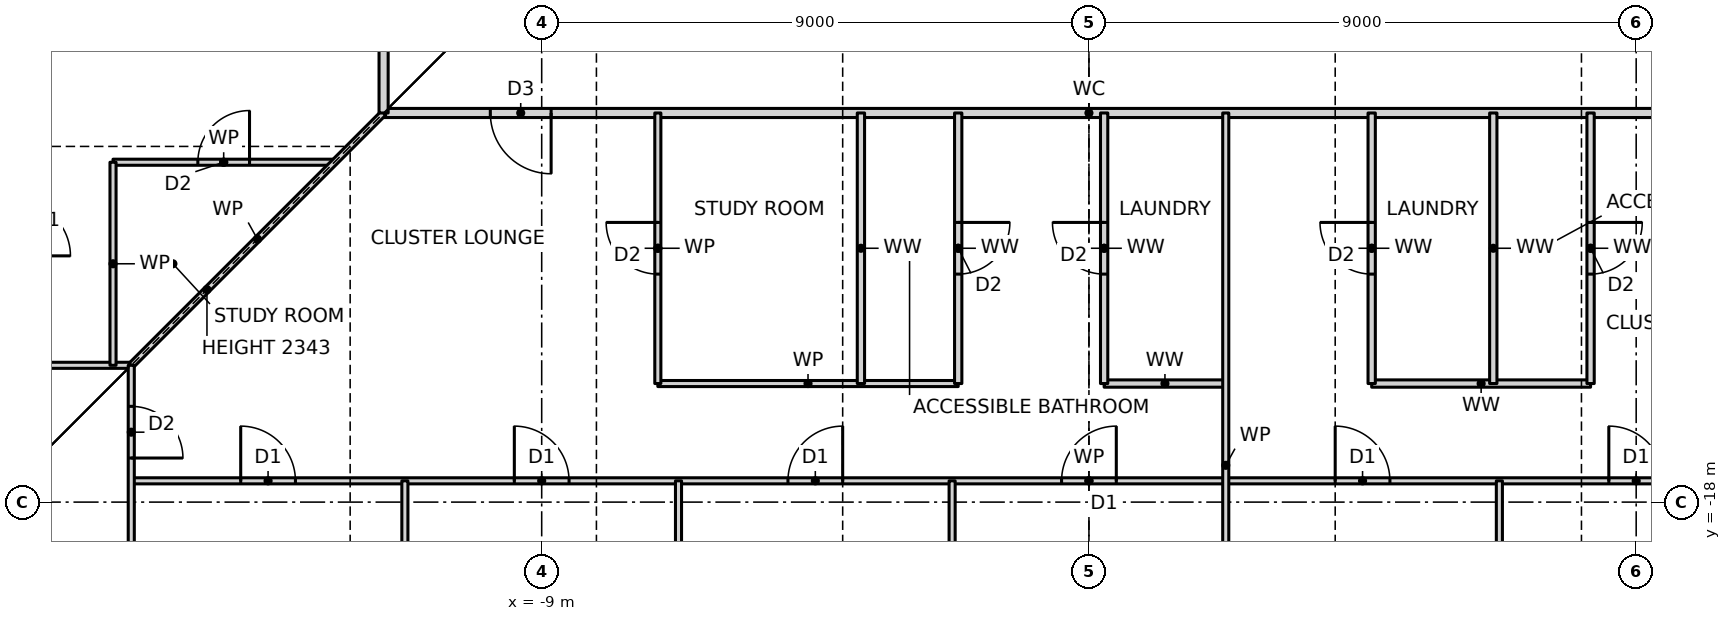
"""IFC4 building model, lengths in metres.
Left out: names, types, materials, properties, quantities, classifications, styles, units other than length and angle.
Written with IfcOpenShell. Run it as: python <this file> out.ifc"""

import sys

from ifc_helpers import new_model, si_unit, direction, frame, frame_2d, origin, place, context, subcontext, project, spatial, rectangle, extrude, element, fill, save


model = new_model("IFC4")
c1 = context("Model", 3, precision=1e-05, world=origin(), true_north=direction((0.0, 1.0)))
c2 = subcontext(c1, "Body", "Model", "MODEL_VIEW")
j1 = project(units=[si_unit("LENGTHUNIT", "METRE"), si_unit("PLANEANGLEUNIT", "RADIAN")], contexts=[c1])
p1 = place(None, origin())
s1 = spatial("IfcSite", under=j1, at=p1, CompositionType="ELEMENT")
p2 = place(p1, origin())
s2 = spatial("IfcBuilding", under=s1, at=p2, CompositionType="ELEMENT")
p3 = place(p2, frame((0.0, 0.0, 64.0)))
s3 = spatial("IfcBuildingStorey", under=s2, at=p3, CompositionType="ELEMENT", Elevation=64.0)
p4 = place(p3, frame((-15.75, -17.65, 0.0), z_axis=(0.0, 0.0, 1.0), x_axis=(1.0, 0.0, 0.0)))
e1 = element("IfcWall", 1, at=p4, inside=s3, PredefinedType="PARTITIONING", context=c2, shape_type="SweptSolid", body=[
    extrude(rectangle(XDim=31.5, YDim=0.1, at=frame_2d((15.75, 0.0))), origin(), (0.0, 0.0, 1.0), 3.27),
])
p5 = place(p4, frame((1.8, 0.0, 0.0)))
e2 = element("IfcOpeningElement", 2, at=p5, cuts=e1, PredefinedType="OPENING", context=c2, shape_type="SweptSolid", body=[
    extrude(rectangle(XDim=0.9, YDim=2.1, at=frame_2d((0.45, 1.05))), frame((0.0, 0.06, 0.0), z_axis=(0.0, -1.0, 0.0), x_axis=(1.0, 0.0, 0.0)), (0.0, 0.0, 1.0), 0.12),
])
p6 = place(p4, frame((6.3, 0.0, 0.0)))
e3 = element("IfcOpeningElement", 3, at=p6, cuts=e1, PredefinedType="OPENING", context=c2, shape_type="SweptSolid", body=[
    extrude(rectangle(XDim=0.9, YDim=2.1, at=frame_2d((0.45, 1.05))), frame((0.0, 0.06, 0.0), z_axis=(0.0, -1.0, 0.0), x_axis=(1.0, 0.0, 0.0)), (0.0, 0.0, 1.0), 0.12),
])
p7 = place(p4, frame((10.8, 0.0, 0.0)))
e4 = element("IfcOpeningElement", 4, at=p7, cuts=e1, PredefinedType="OPENING", context=c2, shape_type="SweptSolid", body=[
    extrude(rectangle(XDim=0.9, YDim=2.1, at=frame_2d((0.45, 1.05))), frame((0.0, 0.06, 0.0), z_axis=(0.0, -1.0, 0.0), x_axis=(1.0, 0.0, 0.0)), (0.0, 0.0, 1.0), 0.12),
])
p8 = place(p4, frame((15.3, 0.0, 0.0)))
e5 = element("IfcOpeningElement", 5, at=p8, cuts=e1, PredefinedType="OPENING", context=c2, shape_type="SweptSolid", body=[
    extrude(rectangle(XDim=0.9, YDim=2.1, at=frame_2d((0.45, 1.05))), frame((0.0, 0.06, 0.0), z_axis=(0.0, -1.0, 0.0), x_axis=(1.0, 0.0, 0.0)), (0.0, 0.0, 1.0), 0.12),
])
p9 = place(p4, frame((19.8, 0.0, 0.0)))
e6 = element("IfcOpeningElement", 6, at=p9, cuts=e1, PredefinedType="OPENING", context=c2, shape_type="SweptSolid", body=[
    extrude(rectangle(XDim=0.9, YDim=2.1, at=frame_2d((0.45, 1.05))), frame((0.0, 0.06, 0.0), z_axis=(0.0, -1.0, 0.0), x_axis=(1.0, 0.0, 0.0)), (0.0, 0.0, 1.0), 0.12),
])
p10 = place(p4, frame((24.3, 0.0, 0.0)))
e7 = element("IfcOpeningElement", 7, at=p10, cuts=e1, PredefinedType="OPENING", context=c2, shape_type="SweptSolid", body=[
    extrude(rectangle(XDim=0.9, YDim=2.1, at=frame_2d((0.45, 1.05))), frame((0.0, 0.06, 0.0), z_axis=(0.0, -1.0, 0.0), x_axis=(1.0, 0.0, 0.0)), (0.0, 0.0, 1.0), 0.12),
])
p11 = place(p4, frame((28.8, 0.0, 0.0)))
e8 = element("IfcOpeningElement", 8, at=p11, cuts=e1, PredefinedType="OPENING", context=c2, shape_type="SweptSolid", body=[
    extrude(rectangle(XDim=0.9, YDim=2.1, at=frame_2d((0.45, 1.05))), frame((0.0, 0.06, 0.0), z_axis=(0.0, -1.0, 0.0), x_axis=(1.0, 0.0, 0.0)), (0.0, 0.0, 1.0), 0.12),
])
p12 = place(p3, frame((-7.09, -16.05, 0.0), z_axis=(0.0, 0.0, 1.0), x_axis=(1.0, 0.0, 0.0)))
e9 = element("IfcWall", 9, at=p12, inside=s3, PredefinedType="PARTITIONING", context=c2, shape_type="SweptSolid", body=[
    extrude(rectangle(XDim=4.94, YDim=0.1, at=frame_2d((2.47, 0.0))), origin(), (0.0, 0.0, 1.0), 3.27),
])
p13 = place(p3, frame((0.25, -16.05, 0.0), z_axis=(0.0, 0.0, 1.0), x_axis=(1.0, 0.0, 0.0)))
e10 = element("IfcWall", 10, at=p13, inside=s3, PredefinedType="PARTITIONING", context=c2, shape_type="SweptSolid", body=[
    extrude(rectangle(XDim=2.0, YDim=0.12, at=frame_2d((1.0, 0.0))), origin(), (0.0, 0.0, 1.0), 3.27),
])
p14 = place(p3, frame((4.65, -16.05, 0.0), z_axis=(0.0, 0.0, 1.0), x_axis=(1.0, 0.0, 0.0)))
e11 = element("IfcWall", 11, at=p14, inside=s3, PredefinedType="PARTITIONING", context=c2, shape_type="SweptSolid", body=[
    extrude(rectangle(XDim=3.6, YDim=0.12, at=frame_2d((1.8, 0.0))), origin(), (0.0, 0.0, 1.0), 3.27),
])
p15 = place(p3, frame((-23.19, -15.75, 0.0), z_axis=(0.0, 0.0, 1.0), x_axis=(1.0, 0.0, 0.0)))
e12 = element("IfcWall", 12, at=p15, inside=s3, PredefinedType="PARTITIONING", context=c2, shape_type="SweptSolid", body=[
    extrude(rectangle(XDim=7.44, YDim=0.1, at=frame_2d((3.72, 0.0))), origin(), (0.0, 0.0, 1.0), 3.27),
])
p16 = place(p3, frame((-16.05, -12.41, 0.0), z_axis=(0.0, 0.0, 1.0), x_axis=(1.0, 0.0, 0.0)))
e13 = element("IfcWall", 13, at=p16, inside=s3, PredefinedType="PARTITIONING", context=c2, shape_type="SweptSolid", body=[
    extrude(rectangle(XDim=3.64, YDim=0.1, at=frame_2d((1.82, 0.0))), origin(), (0.0, 0.0, 1.0), 3.27),
])
p17 = place(p16, frame((1.395, 0.0, 0.0)))
e14 = element("IfcOpeningElement", 14, at=p17, cuts=e13, PredefinedType="OPENING", context=c2, shape_type="SweptSolid", body=[
    extrude(rectangle(XDim=0.85, YDim=2.1, at=frame_2d((0.425, 1.05))), frame((0.0, 0.06, 0.0), z_axis=(0.0, -1.0, 0.0), x_axis=(1.0, 0.0, 0.0)), (0.0, 0.0, 1.0), 0.12),
])
p18 = place(p3, frame((-11.6, -11.6, 0.0), z_axis=(0.0, 0.0, 1.0), x_axis=(1.0, 0.0, 0.0)))
e15 = element("IfcWall", 15, at=p18, inside=s3, PredefinedType="PARTITIONING", context=c2, shape_type="SweptSolid", body=[
    extrude(rectangle(XDim=23.2, YDim=0.15, at=frame_2d((11.6, 0.0))), origin(), (0.0, 0.0, 1.0), 3.27),
])
p19 = place(p18, frame((1.755, 0.0, 0.0)))
e16 = element("IfcOpeningElement", 16, at=p19, cuts=e15, PredefinedType="OPENING", context=c2, shape_type="SweptSolid", body=[
    extrude(rectangle(XDim=1.0, YDim=2.1, at=frame_2d((0.5, 1.05))), frame((0.0, 0.085, 0.0), z_axis=(0.0, -1.0, 0.0), x_axis=(1.0, 0.0, 0.0)), (0.0, 0.0, 1.0), 0.17),
])
p20 = place(p18, frame((21.025, 0.0, 0.0)))
e17 = element("IfcOpeningElement", 17, at=p20, cuts=e15, PredefinedType="OPENING", context=c2, shape_type="SweptSolid", body=[
    extrude(rectangle(XDim=1.0, YDim=2.1, at=frame_2d((0.5, 1.05))), frame((0.0, 0.085, 0.0), z_axis=(0.0, -1.0, 0.0), x_axis=(1.0, 0.0, 0.0)), (0.0, 0.0, 1.0), 0.17),
])
p21 = place(p3, frame((-15.75, -15.75, 0.0), z_axis=(0.0, 0.0, 1.0), x_axis=(0.707106781187, 0.707106781187, 0.0)))
e18 = element("IfcWall", 18, at=p21, inside=s3, PredefinedType="PARTITIONING", context=c2, shape_type="SweptSolid", body=[
    extrude(rectangle(XDim=5.869, YDim=0.1, at=frame_2d((2.935, 0.0))), origin(), (0.0, 0.0, 1.0), 2.343),
])
p22 = place(p3, frame((8.25, -16.05, 0.0), z_axis=(0.0, 0.0, 1.0), x_axis=(0.0, 1.0, 0.0)))
e19 = element("IfcWall", 19, at=p22, inside=s3, PredefinedType="PARTITIONING", context=c2, shape_type="SweptSolid", body=[
    extrude(rectangle(XDim=4.45, YDim=0.12, at=frame_2d((2.225, 0.0))), origin(), (0.0, 0.0, 1.0), 3.27),
])
p23 = place(p22, frame((1.8, 0.0, 0.0)))
e20 = element("IfcOpeningElement", 20, at=p23, cuts=e19, PredefinedType="OPENING", context=c2, shape_type="SweptSolid", body=[
    extrude(rectangle(XDim=0.85, YDim=2.1, at=frame_2d((0.425, 1.05))), frame((0.0, 0.07, 0.0), z_axis=(0.0, -1.0, 0.0), x_axis=(1.0, 0.0, 0.0)), (0.0, 0.0, 1.0), 0.14),
])
p24 = place(p3, frame((6.75, -23.19, 0.0), z_axis=(0.0, 0.0, 1.0), x_axis=(0.0, 1.0, 0.0)))
e21 = element("IfcWall", 21, at=p24, inside=s3, PredefinedType="PARTITIONING", context=c2, shape_type="SweptSolid", body=[
    extrude(rectangle(XDim=5.54, YDim=0.1, at=frame_2d((2.77, 0.0))), origin(), (0.0, 0.0, 1.0), 3.27),
])
p25 = place(p3, frame((6.65, -16.05, 0.0), z_axis=(0.0, 0.0, 1.0), x_axis=(0.0, 1.0, 0.0)))
e22 = element("IfcWall", 22, at=p25, inside=s3, PredefinedType="PARTITIONING", context=c2, shape_type="SweptSolid", body=[
    extrude(rectangle(XDim=4.45, YDim=0.12, at=frame_2d((2.225, 0.0))), origin(), (0.0, 0.0, 1.0), 3.27),
])
p26 = place(p3, frame((4.65, -16.05, 0.0), z_axis=(0.0, 0.0, 1.0), x_axis=(0.0, 1.0, 0.0)))
e23 = element("IfcWall", 23, at=p26, inside=s3, PredefinedType="PARTITIONING", context=c2, shape_type="SweptSolid", body=[
    extrude(rectangle(XDim=4.45, YDim=0.12, at=frame_2d((2.225, 0.0))), origin(), (0.0, 0.0, 1.0), 3.27),
])
p27 = place(p26, frame((1.8, 0.0, 0.0)))
e24 = element("IfcOpeningElement", 24, at=p27, cuts=e23, PredefinedType="OPENING", context=c2, shape_type="SweptSolid", body=[
    extrude(rectangle(XDim=0.85, YDim=2.1, at=frame_2d((0.425, 1.05))), frame((0.0, 0.07, 0.0), z_axis=(0.0, -1.0, 0.0), x_axis=(1.0, 0.0, 0.0)), (0.0, 0.0, 1.0), 0.14),
])
p28 = place(p3, frame((2.25, -23.19, 0.0), z_axis=(0.0, 0.0, 1.0), x_axis=(0.0, 1.0, 0.0)))
e25 = element("IfcWall", 25, at=p28, inside=s3, PredefinedType="PARTITIONING", context=c2, shape_type="SweptSolid", body=[
    extrude(rectangle(XDim=11.59, YDim=0.1, at=frame_2d((5.795, 0.0))), origin(), (0.0, 0.0, 1.0), 3.27),
])
p29 = place(p3, frame((0.25, -16.05, 0.0), z_axis=(0.0, 0.0, 1.0), x_axis=(0.0, 1.0, 0.0)))
e26 = element("IfcWall", 26, at=p29, inside=s3, PredefinedType="PARTITIONING", context=c2, shape_type="SweptSolid", body=[
    extrude(rectangle(XDim=4.45, YDim=0.12, at=frame_2d((2.225, 0.0))), origin(), (0.0, 0.0, 1.0), 3.27),
])
p30 = place(p29, frame((1.8, 0.0, 0.0)))
e27 = element("IfcOpeningElement", 27, at=p30, cuts=e26, PredefinedType="OPENING", context=c2, shape_type="SweptSolid", body=[
    extrude(rectangle(XDim=0.85, YDim=2.1, at=frame_2d((0.425, 1.05))), frame((0.0, 0.07, 0.0), z_axis=(0.0, -1.0, 0.0), x_axis=(1.0, 0.0, 0.0)), (0.0, 0.0, 1.0), 0.14),
])
p31 = place(p3, frame((-2.15, -16.05, 0.0), z_axis=(0.0, 0.0, 1.0), x_axis=(0.0, 1.0, 0.0)))
e28 = element("IfcWall", 28, at=p31, inside=s3, PredefinedType="PARTITIONING", context=c2, shape_type="SweptSolid", body=[
    extrude(rectangle(XDim=4.45, YDim=0.12, at=frame_2d((2.225, 0.0))), origin(), (0.0, 0.0, 1.0), 3.27),
])
p32 = place(p31, frame((1.8, 0.0, 0.0)))
e29 = element("IfcOpeningElement", 29, at=p32, cuts=e28, PredefinedType="OPENING", context=c2, shape_type="SweptSolid", body=[
    extrude(rectangle(XDim=0.85, YDim=2.1, at=frame_2d((0.425, 1.05))), frame((0.0, 0.07, 0.0), z_axis=(0.0, -1.0, 0.0), x_axis=(1.0, 0.0, 0.0)), (0.0, 0.0, 1.0), 0.14),
])
p33 = place(p3, frame((-2.25, -23.19, 0.0), z_axis=(0.0, 0.0, 1.0), x_axis=(0.0, 1.0, 0.0)))
e30 = element("IfcWall", 30, at=p33, inside=s3, PredefinedType="PARTITIONING", context=c2, shape_type="SweptSolid", body=[
    extrude(rectangle(XDim=5.54, YDim=0.1, at=frame_2d((2.77, 0.0))), origin(), (0.0, 0.0, 1.0), 3.27),
])
p34 = place(p3, frame((-3.75, -16.05, 0.0), z_axis=(0.0, 0.0, 1.0), x_axis=(0.0, 1.0, 0.0)))
e31 = element("IfcWall", 31, at=p34, inside=s3, PredefinedType="PARTITIONING", context=c2, shape_type="SweptSolid", body=[
    extrude(rectangle(XDim=4.45, YDim=0.12, at=frame_2d((2.225, 0.0))), origin(), (0.0, 0.0, 1.0), 3.27),
])
p35 = place(p3, frame((-6.75, -23.19, 0.0), z_axis=(0.0, 0.0, 1.0), x_axis=(0.0, 1.0, 0.0)))
e32 = element("IfcWall", 32, at=p35, inside=s3, PredefinedType="PARTITIONING", context=c2, shape_type="SweptSolid", body=[
    extrude(rectangle(XDim=5.54, YDim=0.1, at=frame_2d((2.77, 0.0))), origin(), (0.0, 0.0, 1.0), 3.27),
])
p36 = place(p3, frame((-7.09, -16.05, 0.0), z_axis=(0.0, 0.0, 1.0), x_axis=(0.0, 1.0, 0.0)))
e33 = element("IfcWall", 33, at=p36, inside=s3, PredefinedType="PARTITIONING", context=c2, shape_type="SweptSolid", body=[
    extrude(rectangle(XDim=4.45, YDim=0.1, at=frame_2d((2.225, 0.0))), origin(), (0.0, 0.0, 1.0), 3.27),
])
p37 = place(p36, frame((1.8, 0.0, 0.0)))
e34 = element("IfcOpeningElement", 34, at=p37, cuts=e33, PredefinedType="OPENING", context=c2, shape_type="SweptSolid", body=[
    extrude(rectangle(XDim=0.85, YDim=2.1, at=frame_2d((0.425, 1.05))), frame((0.0, 0.06, 0.0), z_axis=(0.0, -1.0, 0.0), x_axis=(1.0, 0.0, 0.0)), (0.0, 0.0, 1.0), 0.12),
])
p38 = place(p3, frame((-11.25, -23.19, 0.0), z_axis=(0.0, 0.0, 1.0), x_axis=(0.0, 1.0, 0.0)))
e35 = element("IfcWall", 35, at=p38, inside=s3, PredefinedType="PARTITIONING", context=c2, shape_type="SweptSolid", body=[
    extrude(rectangle(XDim=5.54, YDim=0.1, at=frame_2d((2.77, 0.0))), origin(), (0.0, 0.0, 1.0), 3.27),
])
p39 = place(p3, frame((-11.6, -11.6, 0.0), z_axis=(0.0, 0.0, 1.0), x_axis=(0.0, 1.0, 0.0)))
e36 = element("IfcWall", 36, at=p39, inside=s3, PredefinedType="PARTITIONING", context=c2, shape_type="SweptSolid", body=[
    extrude(rectangle(XDim=24.2, YDim=0.15, at=frame_2d((12.1, 0.0))), origin(), (0.0, 0.0, 1.0), 3.27),
])
p40 = place(p39, frame((19.225, 0.0, 0.0)))
e37 = element("IfcOpeningElement", 37, at=p40, cuts=e36, PredefinedType="OPENING", context=c2, shape_type="SweptSolid", body=[
    extrude(rectangle(XDim=1.0, YDim=2.1, at=frame_2d((0.5, 1.05))), frame((0.0, 0.085, 0.0), z_axis=(0.0, -1.0, 0.0), x_axis=(1.0, 0.0, 0.0)), (0.0, 0.0, 1.0), 0.17),
])
p41 = place(p39, frame((3.425, 0.0, 0.0)))
e38 = element("IfcOpeningElement", 38, at=p41, cuts=e36, PredefinedType="OPENING", context=c2, shape_type="SweptSolid", body=[
    extrude(rectangle(XDim=1.0, YDim=2.1, at=frame_2d((0.5, 1.05))), frame((0.0, 0.085, 0.0), z_axis=(0.0, -1.0, 0.0), x_axis=(1.0, 0.0, 0.0)), (0.0, 0.0, 1.0), 0.17),
])
p42 = place(p3, frame((-15.75, -23.19, 0.0), z_axis=(0.0, 0.0, 1.0), x_axis=(0.0, 1.0, 0.0)))
e39 = element("IfcWall", 39, at=p42, inside=s3, PredefinedType="PARTITIONING", context=c2, shape_type="SweptSolid", body=[
    extrude(rectangle(XDim=7.44, YDim=0.1, at=frame_2d((3.72, 0.0))), origin(), (0.0, 0.0, 1.0), 3.27),
])
p43 = place(p42, frame((5.915, 0.0, 0.0)))
e40 = element("IfcOpeningElement", 40, at=p43, cuts=e39, PredefinedType="OPENING", context=c2, shape_type="SweptSolid", body=[
    extrude(rectangle(XDim=0.85, YDim=2.1, at=frame_2d((0.425, 1.05))), frame((0.0, 0.06, 0.0), z_axis=(0.0, -1.0, 0.0), x_axis=(1.0, 0.0, 0.0)), (0.0, 0.0, 1.0), 0.12),
])
p44 = place(p3, frame((-16.05, -15.75, 0.0), z_axis=(0.0, 0.0, 1.0), x_axis=(0.0, 1.0, 0.0)))
e41 = element("IfcWall", 41, at=p44, inside=s3, PredefinedType="PARTITIONING", context=c2, shape_type="SweptSolid", body=[
    extrude(rectangle(XDim=3.34, YDim=0.1, at=frame_2d((1.67, 0.0))), origin(), (0.0, 0.0, 1.0), 3.27),
])
p45 = place(p5, origin())
e42 = element("IfcDoor", 42, at=p45, inside=s3, OperationType="SINGLE_SWING_LEFT", PredefinedType="DOOR", context=c2, shape_type="SweptSolid", body=[
    extrude(rectangle(XDim=0.9, YDim=2.1, at=frame_2d((0.45, 1.05))), frame((0.0, 0.025, 0.0), z_axis=(0.0, -1.0, 0.0), x_axis=(1.0, 0.0, 0.0)), (0.0, 0.0, 1.0), 0.05),
])
fill(e2, e42)
p46 = place(p6, origin())
e43 = element("IfcDoor", 43, at=p46, inside=s3, OperationType="SINGLE_SWING_LEFT", PredefinedType="DOOR", context=c2, shape_type="SweptSolid", body=[
    extrude(rectangle(XDim=0.9, YDim=2.1, at=frame_2d((0.45, 1.05))), frame((0.0, 0.025, 0.0), z_axis=(0.0, -1.0, 0.0), x_axis=(1.0, 0.0, 0.0)), (0.0, 0.0, 1.0), 0.05),
])
fill(e3, e43)
p47 = place(p7, origin())
e44 = element("IfcDoor", 44, at=p47, inside=s3, OperationType="SINGLE_SWING_RIGHT", PredefinedType="DOOR", context=c2, shape_type="SweptSolid", body=[
    extrude(rectangle(XDim=0.9, YDim=2.1, at=frame_2d((0.45, 1.05))), frame((0.0, 0.025, 0.0), z_axis=(0.0, -1.0, 0.0), x_axis=(1.0, 0.0, 0.0)), (0.0, 0.0, 1.0), 0.05),
])
fill(e4, e44)
p48 = place(p8, origin())
e45 = element("IfcDoor", 45, at=p48, inside=s3, OperationType="SINGLE_SWING_RIGHT", PredefinedType="DOOR", context=c2, shape_type="SweptSolid", body=[
    extrude(rectangle(XDim=0.9, YDim=2.1, at=frame_2d((0.45, 1.05))), frame((0.0, 0.025, 0.0), z_axis=(0.0, -1.0, 0.0), x_axis=(1.0, 0.0, 0.0)), (0.0, 0.0, 1.0), 0.05),
])
fill(e5, e45)
p49 = place(p19, frame((1.0, 0.0, 0.0), z_axis=(0.0, 0.0, 1.0), x_axis=(-1.0, 0.0, 0.0)))
e46 = element("IfcDoor", 46, at=p49, inside=s3, OperationType="SINGLE_SWING_LEFT", PredefinedType="DOOR", context=c2, shape_type="SweptSolid", body=[
    extrude(rectangle(XDim=1.0, YDim=2.1, at=frame_2d((0.5, 1.05))), frame((0.0, 0.025, 0.0), z_axis=(0.0, -1.0, 0.0), x_axis=(1.0, 0.0, 0.0)), (0.0, 0.0, 1.0), 0.05),
])
fill(e16, e46)
p50 = place(p37, origin())
e47 = element("IfcDoor", 47, at=p50, inside=s3, OperationType="SINGLE_SWING_RIGHT", PredefinedType="DOOR", context=c2, shape_type="SweptSolid", body=[
    extrude(rectangle(XDim=0.85, YDim=2.1, at=frame_2d((0.425, 1.05))), frame((0.0, 0.025, 0.0), z_axis=(0.0, -1.0, 0.0), x_axis=(1.0, 0.0, 0.0)), (0.0, 0.0, 1.0), 0.05),
])
fill(e34, e47)
p51 = place(p32, frame((0.85, 0.0, 0.0), z_axis=(0.0, 0.0, 1.0), x_axis=(-1.0, 0.0, 0.0)))
e48 = element("IfcDoor", 48, at=p51, inside=s3, OperationType="SINGLE_SWING_LEFT", PredefinedType="DOOR", context=c2, shape_type="SweptSolid", body=[
    extrude(rectangle(XDim=0.85, YDim=2.1, at=frame_2d((0.425, 1.05))), frame((0.0, 0.025, 0.0), z_axis=(0.0, -1.0, 0.0), x_axis=(1.0, 0.0, 0.0)), (0.0, 0.0, 1.0), 0.05),
])
fill(e29, e48)
p52 = place(p30, origin())
e49 = element("IfcDoor", 49, at=p52, inside=s3, OperationType="SINGLE_SWING_RIGHT", PredefinedType="DOOR", context=c2, shape_type="SweptSolid", body=[
    extrude(rectangle(XDim=0.85, YDim=2.1, at=frame_2d((0.425, 1.05))), frame((0.0, 0.025, 0.0), z_axis=(0.0, -1.0, 0.0), x_axis=(1.0, 0.0, 0.0)), (0.0, 0.0, 1.0), 0.05),
])
fill(e27, e49)
p53 = place(p9, origin())
e50 = element("IfcDoor", 50, at=p53, inside=s3, OperationType="SINGLE_SWING_LEFT", PredefinedType="DOOR", context=c2, shape_type="SweptSolid", body=[
    extrude(rectangle(XDim=0.9, YDim=2.1, at=frame_2d((0.45, 1.05))), frame((0.0, 0.025, 0.0), z_axis=(0.0, -1.0, 0.0), x_axis=(1.0, 0.0, 0.0)), (0.0, 0.0, 1.0), 0.05),
])
fill(e6, e50)
p54 = place(p10, origin())
e51 = element("IfcDoor", 51, at=p54, inside=s3, OperationType="SINGLE_SWING_LEFT", PredefinedType="DOOR", context=c2, shape_type="SweptSolid", body=[
    extrude(rectangle(XDim=0.9, YDim=2.1, at=frame_2d((0.45, 1.05))), frame((0.0, 0.025, 0.0), z_axis=(0.0, -1.0, 0.0), x_axis=(1.0, 0.0, 0.0)), (0.0, 0.0, 1.0), 0.05),
])
fill(e7, e51)
p55 = place(p27, origin())
e52 = element("IfcDoor", 52, at=p55, inside=s3, OperationType="SINGLE_SWING_RIGHT", PredefinedType="DOOR", context=c2, shape_type="SweptSolid", body=[
    extrude(rectangle(XDim=0.85, YDim=2.1, at=frame_2d((0.425, 1.05))), frame((0.0, 0.025, 0.0), z_axis=(0.0, -1.0, 0.0), x_axis=(1.0, 0.0, 0.0)), (0.0, 0.0, 1.0), 0.05),
])
fill(e24, e52)
p56 = place(p23, frame((0.85, 0.0, 0.0), z_axis=(0.0, 0.0, 1.0), x_axis=(-1.0, 0.0, 0.0)))
e53 = element("IfcDoor", 53, at=p56, inside=s3, OperationType="SINGLE_SWING_LEFT", PredefinedType="DOOR", context=c2, shape_type="SweptSolid", body=[
    extrude(rectangle(XDim=0.85, YDim=2.1, at=frame_2d((0.425, 1.05))), frame((0.0, 0.025, 0.0), z_axis=(0.0, -1.0, 0.0), x_axis=(1.0, 0.0, 0.0)), (0.0, 0.0, 1.0), 0.05),
])
fill(e20, e53)
p57 = place(p17, origin())
e54 = element("IfcDoor", 54, at=p57, inside=s3, OperationType="SINGLE_SWING_RIGHT", PredefinedType="DOOR", context=c2, shape_type="SweptSolid", body=[
    extrude(rectangle(XDim=0.85, YDim=2.1, at=frame_2d((0.425, 1.05))), frame((0.0, 0.025, 0.0), z_axis=(0.0, -1.0, 0.0), x_axis=(1.0, 0.0, 0.0)), (0.0, 0.0, 1.0), 0.05),
])
fill(e14, e54)
p58 = place(p43, frame((0.85, 0.0, 0.0), z_axis=(0.0, 0.0, 1.0), x_axis=(-1.0, 0.0, 0.0)))
e55 = element("IfcDoor", 55, at=p58, inside=s3, OperationType="SINGLE_SWING_RIGHT", PredefinedType="DOOR", context=c2, shape_type="SweptSolid", body=[
    extrude(rectangle(XDim=0.85, YDim=2.1, at=frame_2d((0.425, 1.05))), frame((0.0, 0.025, 0.0), z_axis=(0.0, -1.0, 0.0), x_axis=(1.0, 0.0, 0.0)), (0.0, 0.0, 1.0), 0.05),
])
fill(e40, e55)
save(model, sys.argv[1])
